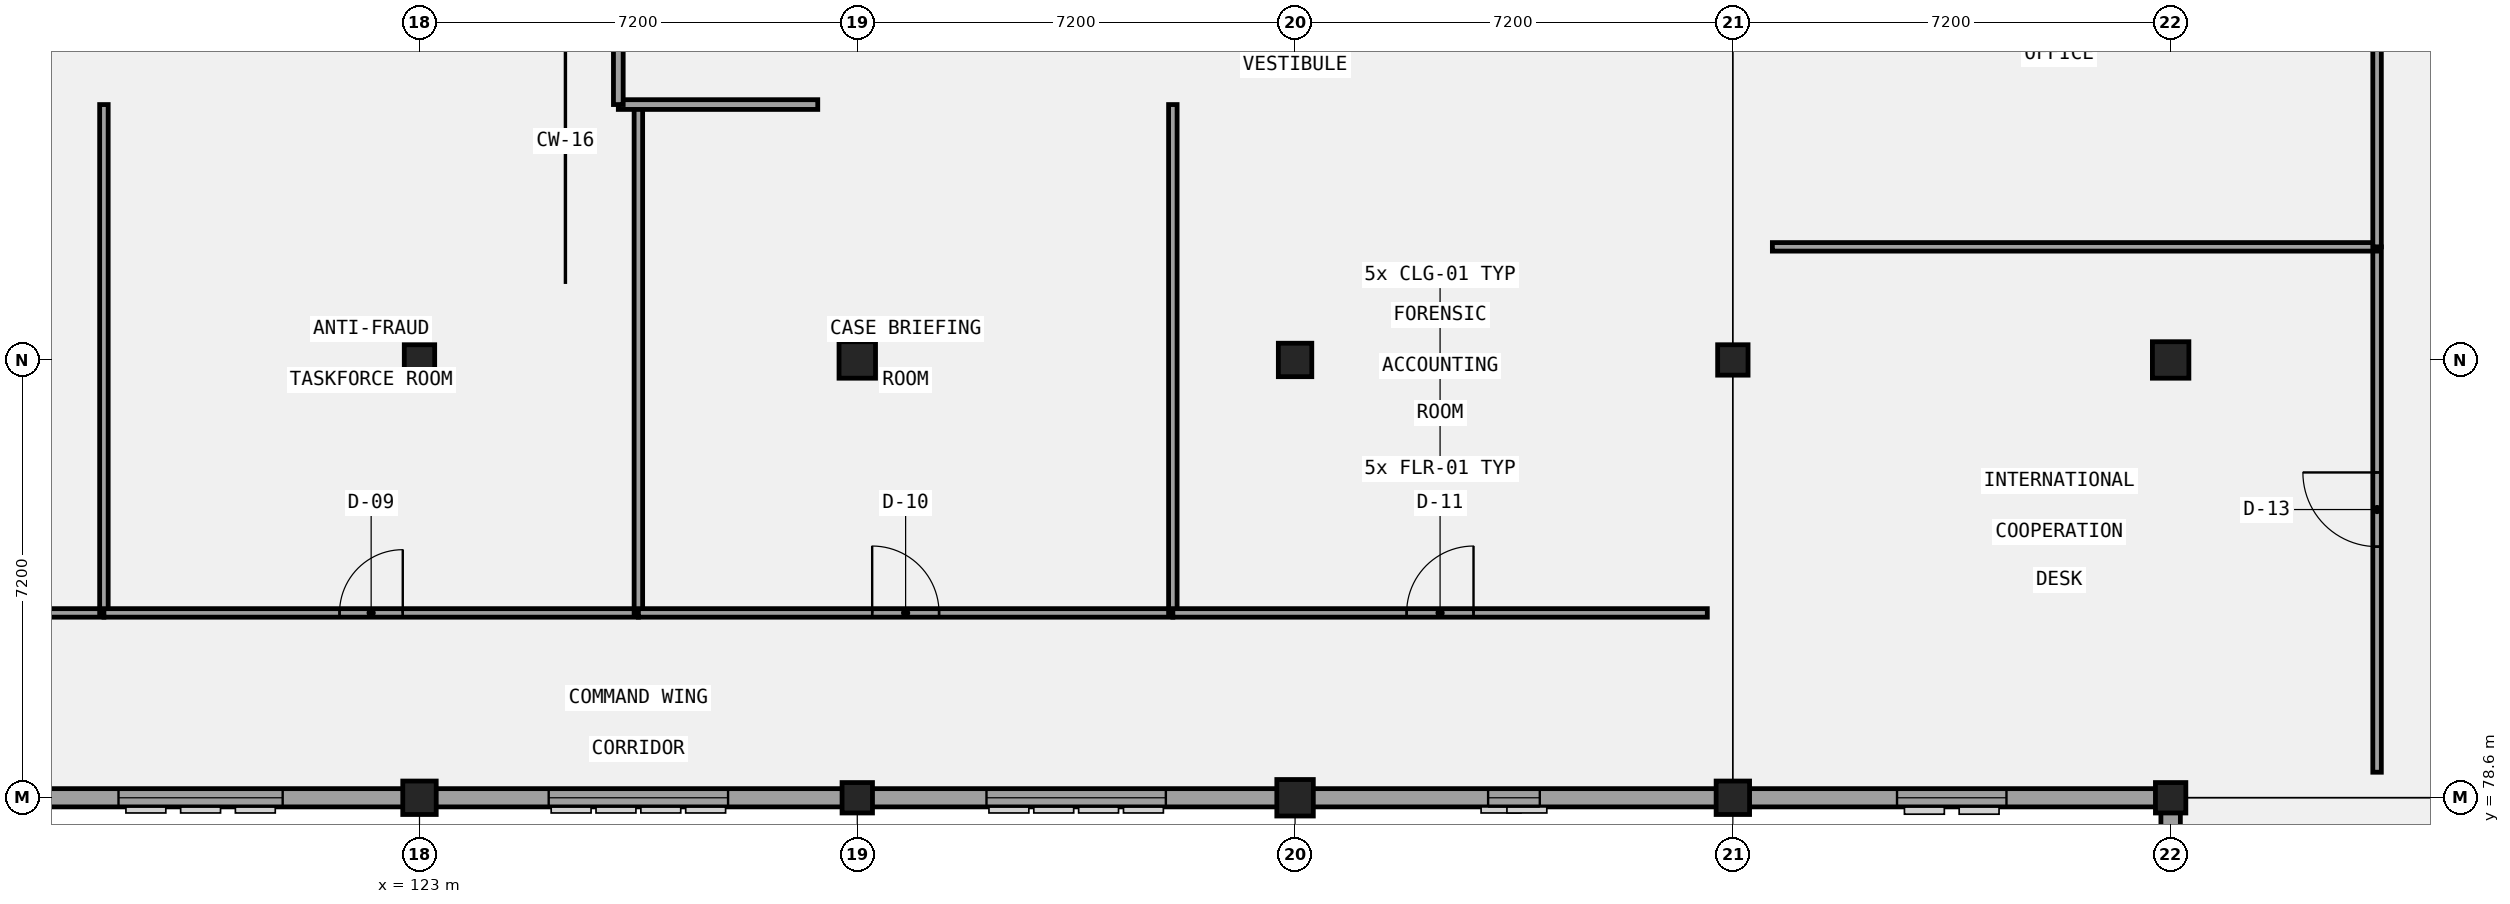
"""IFC4 building model, lengths in metres.
Left out: names, types, materials, properties, quantities, classifications, styles, units other than length and angle.
Written with IfcOpenShell. Run it as: python <this file> out.ifc"""

import sys

from ifc_helpers import new_model, si_unit, direction, frame, frame_2d, origin, origin_2d, place, context, subcontext, project, spatial, rectangle, extrude, element, fill, save


model = new_model("IFC4")
c1 = context("Model", 3, precision=1e-05, world=origin(), true_north=direction((0.0, 1.0)))
c2 = subcontext(c1, "Body", "Model", "MODEL_VIEW")
j1 = project(units=[si_unit("LENGTHUNIT", "METRE"), si_unit("PLANEANGLEUNIT", "RADIAN")], contexts=[c1])
p1 = place(None, origin())
s1 = spatial("IfcSite", under=j1, at=p1, CompositionType="ELEMENT")
p2 = place(p1, origin())
s2 = spatial("IfcBuilding", under=s1, at=p2, CompositionType="ELEMENT")
p3 = place(p2, frame((0.0, 0.0, 18.0)))
s3 = spatial("IfcBuildingStorey", under=s2, at=p3, CompositionType="ELEMENT", Elevation=18.0)
p4 = place(p3, frame((123.0, 78.6, 0.0), z_axis=(0.0, 0.0, 1.0), x_axis=(1.0, 0.0, 0.0)))
e1 = element("IfcColumn", 1, at=p4, inside=s3, PredefinedType="COLUMN", context=c2, shape_type="SweptSolid", body=[
    extrude(rectangle(XDim=0.55, YDim=0.55, at=origin_2d()), origin(), (0.0, 0.0, 1.0), 4.2),
])
for number, where, z_axis, x_axis in (
    (2, (123.0, 85.8, 0.0), (0.0, 0.0, 1.0), (1.0, 0.0, 0.0)),
    (3, (130.2, 78.6, 0.0), (0.0, 0.0, 1.0), (1.0, 0.0, 0.0)),
):
    element("IfcColumn", number, at=place(p3, frame(where, z_axis=z_axis, x_axis=x_axis)), inside=s3, PredefinedType="COLUMN", context=c2, shape_type="SweptSolid", body=[
        extrude(rectangle(XDim=0.5, YDim=0.5, at=origin_2d()), origin(), (0.0, 0.0, 1.0), 4.2),
    ])
for number, where, z_axis, x_axis in (
    (4, (130.2, 85.8, 0.0), (0.0, 0.0, 1.0), (1.0, 0.0, 0.0)),
    (5, (137.4, 78.6, 0.0), (0.0, 0.0, 1.0), (1.0, 0.0, 0.0)),
):
    element("IfcColumn", number, at=place(p3, frame(where, z_axis=z_axis, x_axis=x_axis)), inside=s3, PredefinedType="COLUMN", context=c2, shape_type="SweptSolid", body=[
        extrude(rectangle(XDim=0.6, YDim=0.6, at=origin_2d()), origin(), (0.0, 0.0, 1.0), 4.2),
    ])
for number, where, z_axis, x_axis in (
    (6, (137.4, 85.8, 0.0), (0.0, 0.0, 1.0), (1.0, 0.0, 0.0)),
    (7, (144.6, 78.6, 0.0), (0.0, 0.0, 1.0), (1.0, 0.0, 0.0)),
):
    element("IfcColumn", number, at=place(p3, frame(where, z_axis=z_axis, x_axis=x_axis)), inside=s3, PredefinedType="COLUMN", context=c2, shape_type="SweptSolid", body=[
        extrude(rectangle(XDim=0.55, YDim=0.55, at=origin_2d()), origin(), (0.0, 0.0, 1.0), 4.2),
    ])
for number, where, z_axis, x_axis in (
    (8, (144.6, 85.8, 0.0), (0.0, 0.0, 1.0), (1.0, 0.0, 0.0)),
    (9, (151.8, 78.6, 0.0), (0.0, 0.0, 1.0), (1.0, 0.0, 0.0)),
):
    element("IfcColumn", number, at=place(p3, frame(where, z_axis=z_axis, x_axis=x_axis)), inside=s3, PredefinedType="COLUMN", context=c2, shape_type="SweptSolid", body=[
        extrude(rectangle(XDim=0.5, YDim=0.5, at=origin_2d()), origin(), (0.0, 0.0, 1.0), 4.2),
    ])
p5 = place(p3, frame((151.8, 85.8, 0.0), z_axis=(0.0, 0.0, 1.0), x_axis=(1.0, 0.0, 0.0)))
e10 = element("IfcColumn", 10, at=p5, inside=s3, PredefinedType="COLUMN", context=c2, shape_type="SweptSolid", body=[
    extrude(rectangle(XDim=0.6, YDim=0.6, at=origin_2d()), origin(), (0.0, 0.0, 1.0), 4.2),
])
p6 = place(p3, frame((151.8, 78.44, 0.0), z_axis=(0.0, 0.0, 1.0), x_axis=(0.0, -1.0, 0.0)))
e11 = element("IfcWall", 11, at=p6, inside=s3, PredefinedType="SOLIDWALL", context=c2, shape_type="SweptSolid", body=[
    extrude(rectangle(XDim=28.45, YDim=0.32, at=frame_2d((14.225, 0.0))), origin(), (0.0, 0.0, 1.0), 3.19),
])
p7 = place(p6, frame((24.52, 0.0, 1.0)))
e12 = element("IfcOpeningElement", 12, at=p7, cuts=e11, PredefinedType="OPENING", context=c2, shape_type="SweptSolid", body=[
    extrude(rectangle(XDim=0.85, YDim=1.65, at=frame_2d((0.425, 0.825))), frame((0.0, 0.17, 0.0), z_axis=(0.0, -1.0, 0.0), x_axis=(1.0, 0.0, 0.0)), (0.0, 0.0, 1.0), 0.34),
])
p8 = place(p6, frame((17.415, 0.0, 1.0)))
e13 = element("IfcOpeningElement", 13, at=p8, cuts=e11, PredefinedType="OPENING", context=c2, shape_type="SweptSolid", body=[
    extrude(rectangle(XDim=0.85, YDim=1.65, at=frame_2d((0.425, 0.825))), frame((0.0, 0.17, 0.0), z_axis=(0.0, -1.0, 0.0), x_axis=(1.0, 0.0, 0.0)), (0.0, 0.0, 1.0), 0.34),
])
p9 = place(p6, frame((10.215, 0.0, 1.0)))
e14 = element("IfcOpeningElement", 14, at=p9, cuts=e11, PredefinedType="OPENING", context=c2, shape_type="SweptSolid", body=[
    extrude(rectangle(XDim=0.85, YDim=1.65, at=frame_2d((0.425, 0.825))), frame((0.0, 0.17, 0.0), z_axis=(0.0, -1.0, 0.0), x_axis=(1.0, 0.0, 0.0)), (0.0, 0.0, 1.0), 0.34),
])
p10 = place(p6, frame((3.095, 0.0, 1.0)))
e15 = element("IfcOpeningElement", 15, at=p10, cuts=e11, PredefinedType="OPENING", context=c2, shape_type="SweptSolid", body=[
    extrude(rectangle(XDim=0.85, YDim=1.65, at=frame_2d((0.425, 0.825))), frame((0.0, 0.17, 0.0), z_axis=(0.0, -1.0, 0.0), x_axis=(1.0, 0.0, 0.0)), (0.0, 0.0, 1.0), 0.34),
])
p11 = place(p3, frame((108.45, 78.6, 0.0), z_axis=(0.0, 0.0, 1.0), x_axis=(1.0, 0.0, 0.0)))
e16 = element("IfcWall", 16, at=p11, inside=s3, PredefinedType="SOLIDWALL", context=c2, shape_type="SweptSolid", body=[
    extrude(rectangle(XDim=36.3, YDim=0.3, at=frame_2d((18.15, 0.0))), origin(), (0.0, 0.0, 1.0), 2.94),
])
p12 = place(p11, frame((2.4, 0.0, 0.95)))
e17 = element("IfcOpeningElement", 17, at=p12, cuts=e16, PredefinedType="OPENING", context=c2, shape_type="SweptSolid", body=[
    extrude(rectangle(XDim=2.7, YDim=1.4, at=frame_2d((1.35, 0.7))), frame((0.0, 0.16, 0.0), z_axis=(0.0, -1.0, 0.0), x_axis=(1.0, 0.0, 0.0)), (0.0, 0.0, 1.0), 0.32),
])
p13 = place(p11, frame((9.6, 0.0, 0.95)))
e18 = element("IfcOpeningElement", 18, at=p13, cuts=e16, PredefinedType="OPENING", context=c2, shape_type="SweptSolid", body=[
    extrude(rectangle(XDim=2.7, YDim=1.65, at=frame_2d((1.35, 0.825))), frame((0.0, 0.16, 0.0), z_axis=(0.0, -1.0, 0.0), x_axis=(1.0, 0.0, 0.0)), (0.0, 0.0, 1.0), 0.32),
])
p14 = place(p11, frame((16.675, 0.0, 0.95)))
e19 = element("IfcOpeningElement", 19, at=p14, cuts=e16, PredefinedType="OPENING", context=c2, shape_type="SweptSolid", body=[
    extrude(rectangle(XDim=2.95, YDim=1.4, at=frame_2d((1.475, 0.7))), frame((0.0, 0.16, 0.0), z_axis=(0.0, -1.0, 0.0), x_axis=(1.0, 0.0, 0.0)), (0.0, 0.0, 1.0), 0.32),
])
p15 = place(p11, frame((23.875, 0.0, 0.95)))
e20 = element("IfcOpeningElement", 20, at=p15, cuts=e16, PredefinedType="OPENING", context=c2, shape_type="SweptSolid", body=[
    extrude(rectangle(XDim=2.95, YDim=1.65, at=frame_2d((1.475, 0.825))), frame((0.0, 0.16, 0.0), z_axis=(0.0, -1.0, 0.0), x_axis=(1.0, 0.0, 0.0)), (0.0, 0.0, 1.0), 0.32),
])
p16 = place(p11, frame((32.125, 0.0, 0.95)))
e21 = element("IfcOpeningElement", 21, at=p16, cuts=e16, PredefinedType="OPENING", context=c2, shape_type="SweptSolid", body=[
    extrude(rectangle(XDim=0.85, YDim=1.4, at=frame_2d((0.425, 0.7))), frame((0.0, 0.16, 0.0), z_axis=(0.0, -1.0, 0.0), x_axis=(1.0, 0.0, 0.0)), (0.0, 0.0, 1.0), 0.32),
])
p17 = place(p3, frame((144.45, 78.6, 0.0), z_axis=(0.0, 0.0, 1.0), x_axis=(1.0, 0.0, 0.0)))
e22 = element("IfcWall", 22, at=p17, inside=s3, PredefinedType="SOLIDWALL", context=c2, shape_type="SweptSolid", body=[
    extrude(rectangle(XDim=7.5, YDim=0.3, at=frame_2d((3.75, 0.0))), origin(), (0.0, 0.0, 1.0), 3.29),
])
p18 = place(p17, frame((2.85, 0.0, 0.95)))
e23 = element("IfcOpeningElement", 23, at=p18, cuts=e22, PredefinedType="OPENING", context=c2, shape_type="SweptSolid", body=[
    extrude(rectangle(XDim=1.8, YDim=1.9, at=frame_2d((0.9, 0.95))), frame((0.0, 0.16, 0.0), z_axis=(0.0, -1.0, 0.0), x_axis=(1.0, 0.0, 0.0)), (0.0, 0.0, 1.0), 0.32),
])
p19 = place(p3, frame((109.02, 81.64, 0.0), z_axis=(0.0, 0.0, 1.0), x_axis=(1.0, 0.0, 0.0)))
e24 = element("IfcWall", 24, at=p19, inside=s3, PredefinedType="PARTITIONING", context=c2, shape_type="SweptSolid", body=[
    extrude(rectangle(XDim=8.79, YDim=0.14, at=frame_2d((4.395, 0.0))), origin(), (0.0, 0.0, 1.0), 3.94),
])
p20 = place(p19, frame((3.875, 0.0, 0.0)))
e25 = element("IfcOpeningElement", 25, at=p20, cuts=e24, PredefinedType="OPENING", context=c2, shape_type="SweptSolid", body=[
    extrude(rectangle(XDim=1.04, YDim=2.22, at=frame_2d((0.52, 1.11))), frame((0.0, 0.08, 0.0), z_axis=(0.0, -1.0, 0.0), x_axis=(1.0, 0.0, 0.0)), (0.0, 0.0, 1.0), 0.16),
])
p21 = place(p3, frame((117.81, 81.64, 0.0), z_axis=(0.0, 0.0, 1.0), x_axis=(0.0, 1.0, 0.0)))
e26 = element("IfcWall", 26, at=p21, inside=s3, PredefinedType="PARTITIONING", context=c2, shape_type="SweptSolid", body=[
    extrude(rectangle(XDim=8.36, YDim=0.14, at=frame_2d((4.18, 0.0))), origin(), (0.0, 0.0, 1.0), 3.94),
])
p22 = place(p3, frame((117.81, 81.64, 0.0), z_axis=(0.0, 0.0, 1.0), x_axis=(1.0, 0.0, 0.0)))
e27 = element("IfcWall", 27, at=p22, inside=s3, PredefinedType="PARTITIONING", context=c2, shape_type="SweptSolid", body=[
    extrude(rectangle(XDim=8.79, YDim=0.14, at=frame_2d((4.395, 0.0))), origin(), (0.0, 0.0, 1.0), 3.94),
])
p23 = place(p22, frame((3.875, 0.0, 0.0)))
e28 = element("IfcOpeningElement", 28, at=p23, cuts=e27, PredefinedType="OPENING", context=c2, shape_type="SweptSolid", body=[
    extrude(rectangle(XDim=1.04, YDim=2.35, at=frame_2d((0.52, 1.175))), frame((0.0, 0.08, 0.0), z_axis=(0.0, -1.0, 0.0), x_axis=(1.0, 0.0, 0.0)), (0.0, 0.0, 1.0), 0.16),
])
p24 = place(p3, frame((126.6, 81.64, 0.0), z_axis=(0.0, 0.0, 1.0), x_axis=(0.0, 1.0, 0.0)))
e29 = element("IfcWall", 29, at=p24, inside=s3, PredefinedType="PARTITIONING", context=c2, shape_type="SweptSolid", body=[
    extrude(rectangle(XDim=8.36, YDim=0.14, at=frame_2d((4.18, 0.0))), origin(), (0.0, 0.0, 1.0), 3.94),
])
p25 = place(p3, frame((126.6, 81.64, 0.0), z_axis=(0.0, 0.0, 1.0), x_axis=(1.0, 0.0, 0.0)))
e30 = element("IfcWall", 30, at=p25, inside=s3, PredefinedType="PARTITIONING", context=c2, shape_type="SweptSolid", body=[
    extrude(rectangle(XDim=8.79, YDim=0.14, at=frame_2d((4.395, 0.0))), origin(), (0.0, 0.0, 1.0), 3.94),
])
p26 = place(p25, frame((3.845, 0.0, 0.0)))
e31 = element("IfcOpeningElement", 31, at=p26, cuts=e30, PredefinedType="OPENING", context=c2, shape_type="SweptSolid", body=[
    extrude(rectangle(XDim=1.1, YDim=2.1, at=frame_2d((0.55, 1.05))), frame((0.0, 0.08, 0.0), z_axis=(0.0, -1.0, 0.0), x_axis=(1.0, 0.0, 0.0)), (0.0, 0.0, 1.0), 0.16),
])
p27 = place(p3, frame((135.39, 81.64, 0.0), z_axis=(0.0, 0.0, 1.0), x_axis=(0.0, 1.0, 0.0)))
e32 = element("IfcWall", 32, at=p27, inside=s3, PredefinedType="PARTITIONING", context=c2, shape_type="SweptSolid", body=[
    extrude(rectangle(XDim=8.36, YDim=0.14, at=frame_2d((4.18, 0.0))), origin(), (0.0, 0.0, 1.0), 3.94),
])
p28 = place(p3, frame((135.39, 81.64, 0.0), z_axis=(0.0, 0.0, 1.0), x_axis=(1.0, 0.0, 0.0)))
e33 = element("IfcWall", 33, at=p28, inside=s3, PredefinedType="PARTITIONING", context=c2, shape_type="SweptSolid", body=[
    extrude(rectangle(XDim=8.79, YDim=0.14, at=frame_2d((4.395, 0.0))), origin(), (0.0, 0.0, 1.0), 3.94),
])
p29 = place(p28, frame((3.845, 0.0, 0.0)))
e34 = element("IfcOpeningElement", 34, at=p29, cuts=e33, PredefinedType="OPENING", context=c2, shape_type="SweptSolid", body=[
    extrude(rectangle(XDim=1.1, YDim=2.22, at=frame_2d((0.55, 1.11))), frame((0.0, 0.08, 0.0), z_axis=(0.0, -1.0, 0.0), x_axis=(1.0, 0.0, 0.0)), (0.0, 0.0, 1.0), 0.16),
])
p30 = place(p3, frame((126.27, 90.0, 0.0), z_axis=(0.0, 0.0, 1.0), x_axis=(1.0, 0.0, 0.0)))
e35 = element("IfcWall", 35, at=p30, inside=s3, PredefinedType="PARTITIONING", context=c2, shape_type="SweptSolid", body=[
    extrude(rectangle(XDim=3.28, YDim=0.16, at=frame_2d((1.64, 0.0))), origin(), (0.0, 0.0, 1.0), 3.94),
])
p31 = place(p3, frame((126.27, 90.0, 0.0), z_axis=(0.0, 0.0, 1.0), x_axis=(0.0, 1.0, 0.0)))
e36 = element("IfcWall", 36, at=p31, inside=s3, PredefinedType="PARTITIONING", context=c2, shape_type="SweptSolid", body=[
    extrude(rectangle(XDim=10.85, YDim=0.16, at=frame_2d((5.425, 0.0))), origin(), (0.0, 0.0, 1.0), 3.94),
])
p32 = place(p31, frame((4.875, 0.0, 0.0)))
e37 = element("IfcOpeningElement", 37, at=p32, cuts=e36, PredefinedType="OPENING", context=c2, shape_type="SweptSolid", body=[
    extrude(rectangle(XDim=1.1, YDim=2.35, at=frame_2d((0.55, 1.175))), frame((0.0, 0.09, 0.0), z_axis=(0.0, -1.0, 0.0), x_axis=(1.0, 0.0, 0.0)), (0.0, 0.0, 1.0), 0.18),
])
p33 = place(p3, frame((155.195, 79.02, 0.0), z_axis=(0.0, 0.0, 1.0), x_axis=(0.0, 1.0, 0.0)))
e38 = element("IfcWall", 38, at=p33, inside=s3, PredefinedType="PARTITIONING", context=c2, shape_type="SweptSolid", body=[
    extrude(rectangle(XDim=8.64, YDim=0.14, at=frame_2d((4.32, 0.0))), origin(), (0.0, 0.0, 1.0), 3.94),
])
p34 = place(p33, frame((3.71, 0.0, 0.0)))
e39 = element("IfcOpeningElement", 39, at=p34, cuts=e38, PredefinedType="OPENING", context=c2, shape_type="SweptSolid", body=[
    extrude(rectangle(XDim=1.22, YDim=2.1, at=frame_2d((0.61, 1.05))), frame((0.0, 0.08, 0.0), z_axis=(0.0, -1.0, 0.0), x_axis=(1.0, 0.0, 0.0)), (0.0, 0.0, 1.0), 0.16),
])
p35 = place(p3, frame((145.25, 87.66, 0.0), z_axis=(0.0, 0.0, 1.0), x_axis=(1.0, 0.0, 0.0)))
e40 = element("IfcWall", 40, at=p35, inside=s3, PredefinedType="PARTITIONING", context=c2, shape_type="SweptSolid", body=[
    extrude(rectangle(XDim=9.945, YDim=0.14, at=frame_2d((4.973, 0.0))), origin(), (0.0, 0.0, 1.0), 3.39),
])
p36 = place(p3, frame((155.195, 87.66, 0.0), z_axis=(0.0, 0.0, 1.0), x_axis=(0.0, 1.0, 0.0)))
e41 = element("IfcWall", 41, at=p36, inside=s3, PredefinedType="PARTITIONING", context=c2, shape_type="SweptSolid", body=[
    extrude(rectangle(XDim=8.64, YDim=0.14, at=frame_2d((4.32, 0.0))), origin(), (0.0, 0.0, 1.0), 3.94),
])
p37 = place(p36, frame((3.71, 0.0, 0.0)))
e42 = element("IfcOpeningElement", 42, at=p37, cuts=e41, PredefinedType="OPENING", context=c2, shape_type="SweptSolid", body=[
    extrude(rectangle(XDim=1.22, YDim=2.22, at=frame_2d((0.61, 1.11))), frame((0.0, 0.08, 0.0), z_axis=(0.0, -1.0, 0.0), x_axis=(1.0, 0.0, 0.0)), (0.0, 0.0, 1.0), 0.16),
])
p38 = place(p13, origin())
e43 = element("IfcWindow", 43, at=p38, inside=s3, PartitioningType="SINGLE_PANEL", PredefinedType="WINDOW", context=c2, shape_type="SweptSolid", body=[
    extrude(rectangle(XDim=2.7, YDim=1.65, at=frame_2d((1.35, 0.825))), frame((0.0, 0.03, 0.0), z_axis=(0.0, -1.0, 0.0), x_axis=(1.0, 0.0, 0.0)), (0.0, 0.0, 1.0), 0.06),
])
fill(e18, e43)
p39 = place(p14, origin())
e44 = element("IfcWindow", 44, at=p39, inside=s3, PartitioningType="SINGLE_PANEL", PredefinedType="WINDOW", context=c2, shape_type="SweptSolid", body=[
    extrude(rectangle(XDim=2.95, YDim=1.4, at=frame_2d((1.475, 0.7))), frame((0.0, 0.03, 0.0), z_axis=(0.0, -1.0, 0.0), x_axis=(1.0, 0.0, 0.0)), (0.0, 0.0, 1.0), 0.06),
])
fill(e19, e44)
p40 = place(p15, origin())
e45 = element("IfcWindow", 45, at=p40, inside=s3, PartitioningType="SINGLE_PANEL", PredefinedType="WINDOW", context=c2, shape_type="SweptSolid", body=[
    extrude(rectangle(XDim=2.95, YDim=1.65, at=frame_2d((1.475, 0.825))), frame((0.0, 0.03, 0.0), z_axis=(0.0, -1.0, 0.0), x_axis=(1.0, 0.0, 0.0)), (0.0, 0.0, 1.0), 0.06),
])
fill(e20, e45)
p41 = place(p16, origin())
e46 = element("IfcWindow", 46, at=p41, inside=s3, PartitioningType="SINGLE_PANEL", PredefinedType="WINDOW", context=c2, shape_type="SweptSolid", body=[
    extrude(rectangle(XDim=0.85, YDim=1.4, at=frame_2d((0.425, 0.7))), frame((0.0, 0.03, 0.0), z_axis=(0.0, -1.0, 0.0), x_axis=(1.0, 0.0, 0.0)), (0.0, 0.0, 1.0), 0.06),
])
fill(e21, e46)
p42 = place(p18, origin())
e47 = element("IfcWindow", 47, at=p42, inside=s3, PartitioningType="SINGLE_PANEL", PredefinedType="WINDOW", context=c2, shape_type="SweptSolid", body=[
    extrude(rectangle(XDim=1.8, YDim=1.9, at=frame_2d((0.9, 0.95))), frame((0.0, 0.03, 0.0), z_axis=(0.0, -1.0, 0.0), x_axis=(1.0, 0.0, 0.0)), (0.0, 0.0, 1.0), 0.06),
])
fill(e23, e47)
p43 = place(p23, origin())
e48 = element("IfcDoor", 48, at=p43, inside=s3, OperationType="SINGLE_SWING_RIGHT", PredefinedType="DOOR", context=c2, shape_type="SweptSolid", body=[
    extrude(rectangle(XDim=1.04, YDim=2.35, at=frame_2d((0.52, 1.175))), frame((0.0, 0.025, 0.0), z_axis=(0.0, -1.0, 0.0), x_axis=(1.0, 0.0, 0.0)), (0.0, 0.0, 1.0), 0.05),
])
fill(e28, e48)
p44 = place(p26, origin())
e49 = element("IfcDoor", 49, at=p44, inside=s3, OperationType="SINGLE_SWING_LEFT", PredefinedType="DOOR", context=c2, shape_type="SweptSolid", body=[
    extrude(rectangle(XDim=1.1, YDim=2.1, at=frame_2d((0.55, 1.05))), frame((0.0, 0.025, 0.0), z_axis=(0.0, -1.0, 0.0), x_axis=(1.0, 0.0, 0.0)), (0.0, 0.0, 1.0), 0.05),
])
fill(e31, e49)
p45 = place(p29, origin())
e50 = element("IfcDoor", 50, at=p45, inside=s3, OperationType="SINGLE_SWING_RIGHT", PredefinedType="DOOR", context=c2, shape_type="SweptSolid", body=[
    extrude(rectangle(XDim=1.1, YDim=2.22, at=frame_2d((0.55, 1.11))), frame((0.0, 0.025, 0.0), z_axis=(0.0, -1.0, 0.0), x_axis=(1.0, 0.0, 0.0)), (0.0, 0.0, 1.0), 0.05),
])
fill(e34, e50)
p46 = place(p34, frame((1.22, 0.0, 0.0), z_axis=(0.0, 0.0, 1.0), x_axis=(-1.0, 0.0, 0.0)))
e51 = element("IfcDoor", 51, at=p46, inside=s3, OperationType="SINGLE_SWING_RIGHT", PredefinedType="DOOR", context=c2, shape_type="SweptSolid", body=[
    extrude(rectangle(XDim=1.22, YDim=2.1, at=frame_2d((0.61, 1.05))), frame((0.0, 0.025, 0.0), z_axis=(0.0, -1.0, 0.0), x_axis=(1.0, 0.0, 0.0)), (0.0, 0.0, 1.0), 0.05),
])
fill(e39, e51)
save(model, sys.argv[1])
